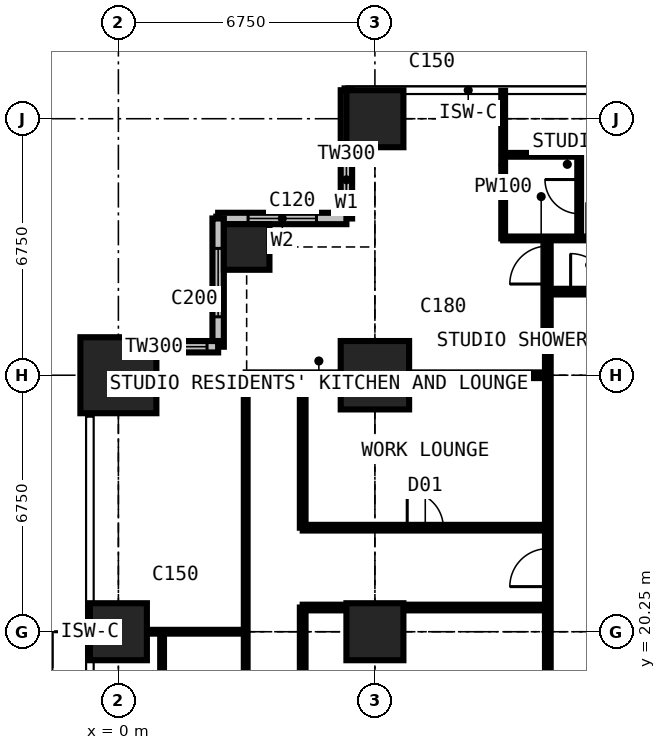
"""IFC4 building model, lengths in metres.
Left out: names, types, materials, properties, quantities, classifications, styles, units other than length and angle.
Written with IfcOpenShell. Run it as: python <this file> out.ifc"""

import sys

from ifc_helpers import new_model, si_unit, direction, frame, frame_2d, origin, origin_2d, place, context, subcontext, project, spatial, rectangle, extrude, element, fill, save


model = new_model("IFC4")
c1 = context("Model", 3, precision=1e-05, world=origin(), true_north=direction((0.0, 1.0)))
c2 = subcontext(c1, "Body", "Model", "MODEL_VIEW")
j1 = project(units=[si_unit("LENGTHUNIT", "METRE"), si_unit("PLANEANGLEUNIT", "RADIAN")], contexts=[c1])
p1 = place(None, origin())
s1 = spatial("IfcSite", under=j1, at=p1, CompositionType="ELEMENT")
p2 = place(p1, origin())
s2 = spatial("IfcBuilding", under=s1, at=p2, CompositionType="ELEMENT")
p3 = place(p2, frame((0.0, 0.0, 145.8)))
s3 = spatial("IfcBuildingStorey", under=s2, at=p3, CompositionType="ELEMENT", Elevation=145.8)
p4 = place(p3, frame((0.0, 20.25, 0.0), z_axis=(0.0, 0.0, 1.0), x_axis=(1.0, 0.0, 0.0)))
e1 = element("IfcColumn", 1, at=p4, inside=s3, PredefinedType="COLUMN", context=c2, shape_type="SweptSolid", body=[
    extrude(rectangle(XDim=1.5, YDim=1.5, at=origin_2d()), origin(), (0.0, 0.0, 1.0), 3.6),
])
p5 = place(p3, frame((0.0, 27.0, 0.0), z_axis=(0.0, 0.0, 1.0), x_axis=(1.0, 0.0, 0.0)))
e2 = element("IfcColumn", 2, at=p5, inside=s3, PredefinedType="COLUMN", context=c2, shape_type="SweptSolid", body=[
    extrude(rectangle(XDim=2.0, YDim=2.0, at=origin_2d()), origin(), (0.0, 0.0, 1.0), 3.6),
])
p6 = place(p3, frame((3.375, 30.375, 0.0), z_axis=(0.0, 0.0, 1.0), x_axis=(1.0, 0.0, 0.0)))
e3 = element("IfcColumn", 3, at=p6, inside=s3, PredefinedType="COLUMN", context=c2, shape_type="SweptSolid", body=[
    extrude(rectangle(XDim=1.2, YDim=1.2, at=origin_2d()), origin(), (0.0, 0.0, 1.0), 3.6),
])
p7 = place(p3, frame((6.75, 20.25, 0.0), z_axis=(0.0, 0.0, 1.0), x_axis=(1.0, 0.0, 0.0)))
e4 = element("IfcColumn", 4, at=p7, inside=s3, PredefinedType="COLUMN", context=c2, shape_type="SweptSolid", body=[
    extrude(rectangle(XDim=1.5, YDim=1.5, at=origin_2d()), origin(), (0.0, 0.0, 1.0), 3.6),
])
p8 = place(p3, frame((6.75, 27.0, 0.0), z_axis=(0.0, 0.0, 1.0), x_axis=(1.0, 0.0, 0.0)))
e5 = element("IfcColumn", 5, at=p8, inside=s3, PredefinedType="COLUMN", context=c2, shape_type="SweptSolid", body=[
    extrude(rectangle(XDim=1.8, YDim=1.8, at=origin_2d()), origin(), (0.0, 0.0, 1.0), 3.6),
])
p9 = place(p3, frame((6.75, 33.75, 0.0), z_axis=(0.0, 0.0, 1.0), x_axis=(1.0, 0.0, 0.0)))
e6 = element("IfcColumn", 6, at=p9, inside=s3, PredefinedType="COLUMN", context=c2, shape_type="SweptSolid", body=[
    extrude(rectangle(XDim=1.5, YDim=1.5, at=origin_2d()), origin(), (0.0, 0.0, 1.0), 3.6),
])
p10 = place(p3, frame((6.0, 34.5, 0.0), z_axis=(0.0, 0.0, 1.0), x_axis=(0.0, -1.0, 0.0)))
e7 = element("IfcWall", 7, at=p10, inside=s3, PredefinedType="SOLIDWALL", context=c2, shape_type="SweptSolid", body=[
    extrude(rectangle(XDim=3.375, YDim=0.3, at=frame_2d((1.688, 0.0))), origin(), (0.0, 0.0, 1.0), 3.375),
])
p11 = place(p10, frame((1.607, 0.0, 0.9)))
e8 = element("IfcOpeningElement", 8, at=p11, cuts=e7, PredefinedType="OPENING", context=c2, shape_type="SweptSolid", body=[
    extrude(rectangle(XDim=1.5, YDim=1.8, at=frame_2d((0.75, 0.9))), frame((0.0, 0.16, 0.0), z_axis=(0.0, -1.0, 0.0), x_axis=(1.0, 0.0, 0.0)), (0.0, 0.0, 1.0), 0.32),
])
p12 = place(p3, frame((6.0, 31.125, 0.0), z_axis=(0.0, 0.0, 1.0), x_axis=(-1.0, 0.0, 0.0)))
e9 = element("IfcWall", 9, at=p12, inside=s3, PredefinedType="SOLIDWALL", context=c2, shape_type="SweptSolid", body=[
    extrude(rectangle(XDim=3.375, YDim=0.3, at=frame_2d((1.688, 0.0))), origin(), (0.0, 0.0, 1.0), 3.375),
])
p13 = place(p12, frame((0.788, 0.0, 0.6)))
e10 = element("IfcOpeningElement", 10, at=p13, cuts=e9, PredefinedType="OPENING", context=c2, shape_type="SweptSolid", body=[
    extrude(rectangle(XDim=1.8, YDim=2.1, at=frame_2d((0.9, 1.05))), frame((0.0, 0.16, 0.0), z_axis=(0.0, -1.0, 0.0), x_axis=(1.0, 0.0, 0.0)), (0.0, 0.0, 1.0), 0.32),
])
p14 = place(p3, frame((2.625, 31.125, 0.0), z_axis=(0.0, 0.0, 1.0), x_axis=(0.0, -1.0, 0.0)))
e11 = element("IfcWall", 11, at=p14, inside=s3, PredefinedType="SOLIDWALL", context=c2, shape_type="SweptSolid", body=[
    extrude(rectangle(XDim=3.375, YDim=0.3, at=frame_2d((1.688, 0.0))), origin(), (0.0, 0.0, 1.0), 3.375),
])
p15 = place(p14, frame((0.788, 0.0, 0.6)))
e12 = element("IfcOpeningElement", 12, at=p15, cuts=e11, PredefinedType="OPENING", context=c2, shape_type="SweptSolid", body=[
    extrude(rectangle(XDim=1.8, YDim=2.1, at=frame_2d((0.9, 1.05))), frame((0.0, 0.16, 0.0), z_axis=(0.0, -1.0, 0.0), x_axis=(1.0, 0.0, 0.0)), (0.0, 0.0, 1.0), 0.32),
])
p16 = place(p3, frame((2.625, 27.75, 0.0), z_axis=(0.0, 0.0, 1.0), x_axis=(-1.0, 0.0, 0.0)))
e13 = element("IfcWall", 13, at=p16, inside=s3, PredefinedType="SOLIDWALL", context=c2, shape_type="SweptSolid", body=[
    extrude(rectangle(XDim=3.375, YDim=0.3, at=frame_2d((1.688, 0.0))), origin(), (0.0, 0.0, 1.0), 3.375),
])
p17 = place(p16, frame((0.292, 0.0, 0.9)))
e14 = element("IfcOpeningElement", 14, at=p17, cuts=e13, PredefinedType="OPENING", context=c2, shape_type="SweptSolid", body=[
    extrude(rectangle(XDim=1.2, YDim=1.8, at=frame_2d((0.6, 0.9))), frame((0.0, 0.16, 0.0), z_axis=(0.0, -1.0, 0.0), x_axis=(1.0, 0.0, 0.0)), (0.0, 0.0, 1.0), 0.32),
])
p18 = place(p3, frame((-0.734, 20.25, 0.0), z_axis=(0.0, 0.0, 1.0), x_axis=(1.0, 0.0, 0.0)))
e15 = element("IfcWall", 15, at=p18, inside=s3, PredefinedType="PARTITIONING", context=c2, shape_type="SweptSolid", body=[
    extrude(rectangle(XDim=4.084, YDim=0.1, at=frame_2d((2.042, 0.0))), origin(), (0.0, 0.0, 1.0), 2.61),
])
p19 = place(p3, frame((1.15, 18.25, 0.0), z_axis=(0.0, 0.0, 1.0), x_axis=(0.0, 1.0, 0.0)))
e16 = element("IfcWall", 16, at=p19, inside=s3, PredefinedType="PARTITIONING", context=c2, shape_type="SweptSolid", body=[
    extrude(rectangle(XDim=2.0, YDim=0.1, at=frame_2d((1.0, 0.0))), origin(), (0.0, 0.0, 1.0), 3.375),
])
p20 = place(p3, frame((3.35, 10.125, 0.0), z_axis=(0.0, 0.0, 1.0), x_axis=(0.0, 1.0, 0.0)))
e17 = element("IfcWall", 17, at=p20, inside=s3, PredefinedType="PARTITIONING", context=c2, shape_type="SweptSolid", body=[
    extrude(rectangle(XDim=16.875, YDim=0.1, at=frame_2d((8.438, 0.0))), origin(), (0.0, 0.0, 1.0), 3.375),
])
p21 = place(p20, frame((0.2, 0.0, 0.0)))
e18 = element("IfcOpeningElement", 18, at=p21, cuts=e17, PredefinedType="OPENING", context=c2, shape_type="SweptSolid", body=[
    extrude(rectangle(XDim=0.95, YDim=2.2, at=frame_2d((0.475, 1.1))), frame((0.0, 0.06, 0.0), z_axis=(0.0, -1.0, 0.0), x_axis=(1.0, 0.0, 0.0)), (0.0, 0.0, 1.0), 0.12),
])
p22 = place(p20, frame((3.575, 0.0, 0.0)))
e19 = element("IfcOpeningElement", 19, at=p22, cuts=e17, PredefinedType="OPENING", context=c2, shape_type="SweptSolid", body=[
    extrude(rectangle(XDim=0.95, YDim=2.2, at=frame_2d((0.475, 1.1))), frame((0.0, 0.06, 0.0), z_axis=(0.0, -1.0, 0.0), x_axis=(1.0, 0.0, 0.0)), (0.0, 0.0, 1.0), 0.12),
])
p23 = place(p20, frame((6.95, 0.0, 0.0)))
e20 = element("IfcOpeningElement", 20, at=p23, cuts=e17, PredefinedType="OPENING", context=c2, shape_type="SweptSolid", body=[
    extrude(rectangle(XDim=0.95, YDim=2.2, at=frame_2d((0.475, 1.1))), frame((0.0, 0.06, 0.0), z_axis=(0.0, -1.0, 0.0), x_axis=(1.0, 0.0, 0.0)), (0.0, 0.0, 1.0), 0.12),
])
p24 = place(p3, frame((3.35, 27.0, 0.0), z_axis=(0.0, 0.0, 1.0), x_axis=(1.0, 0.0, 0.0)))
e21 = element("IfcWall", 21, at=p24, inside=s3, PredefinedType="PARTITIONING", context=c2, shape_type="SweptSolid", body=[
    extrude(rectangle(XDim=7.95, YDim=0.15, at=frame_2d((3.975, 0.0))), origin(), (0.0, 0.0, 1.0), 2.806),
])
p25 = place(p3, frame((4.85, 12.775, 0.0), z_axis=(0.0, 0.0, 1.0), x_axis=(0.0, 1.0, 0.0)))
e22 = element("IfcWall", 22, at=p25, inside=s3, PredefinedType="PARTITIONING", context=c2, shape_type="SweptSolid", body=[
    extrude(rectangle(XDim=8.113, YDim=0.15, at=frame_2d((4.056, 0.0))), origin(), (0.0, 0.0, 1.0), 3.375),
])
p26 = place(p25, frame((3.6, 0.0, 0.0)))
e23 = element("IfcOpeningElement", 23, at=p26, cuts=e22, PredefinedType="OPENING", context=c2, shape_type="SweptSolid", body=[
    extrude(rectangle(XDim=0.95, YDim=2.2, at=frame_2d((0.475, 1.1))), frame((0.0, 0.085, 0.0), z_axis=(0.0, -1.0, 0.0), x_axis=(1.0, 0.0, 0.0)), (0.0, 0.0, 1.0), 0.17),
])
p27 = place(p3, frame((4.85, 20.887, 0.0), z_axis=(0.0, 0.0, 1.0), x_axis=(1.0, 0.0, 0.0)))
e24 = element("IfcWall", 24, at=p27, inside=s3, PredefinedType="PARTITIONING", context=c2, shape_type="SweptSolid", body=[
    extrude(rectangle(XDim=6.45, YDim=0.15, at=frame_2d((3.225, 0.0))), origin(), (0.0, 0.0, 1.0), 3.375),
])
p28 = place(p3, frame((4.85, 22.988, 0.0), z_axis=(0.0, 0.0, 1.0), x_axis=(0.0, 1.0, 0.0)))
e25 = element("IfcWall", 25, at=p28, inside=s3, PredefinedType="PARTITIONING", context=c2, shape_type="SweptSolid", body=[
    extrude(rectangle(XDim=4.012, YDim=0.15, at=frame_2d((2.006, 0.0))), origin(), (0.0, 0.0, 1.0), 3.375),
])
p29 = place(p3, frame((4.85, 22.988, 0.0), z_axis=(0.0, 0.0, 1.0), x_axis=(1.0, 0.0, 0.0)))
e26 = element("IfcWall", 26, at=p29, inside=s3, PredefinedType="PARTITIONING", context=c2, shape_type="SweptSolid", body=[
    extrude(rectangle(XDim=6.45, YDim=0.15, at=frame_2d((3.225, 0.0))), origin(), (0.0, 0.0, 1.0), 3.375),
])
p30 = place(p29, frame((2.75, 0.0, 0.0)))
e27 = element("IfcOpeningElement", 27, at=p30, cuts=e26, PredefinedType="OPENING", context=c2, shape_type="SweptSolid", body=[
    extrude(rectangle(XDim=0.95, YDim=2.2, at=frame_2d((0.475, 1.1))), frame((0.0, 0.085, 0.0), z_axis=(0.0, -1.0, 0.0), x_axis=(1.0, 0.0, 0.0)), (0.0, 0.0, 1.0), 0.17),
])
p31 = place(p3, frame((10.125, 30.6, 0.0), z_axis=(0.0, 0.0, 1.0), x_axis=(0.0, 1.0, 0.0)))
e28 = element("IfcWall", 28, at=p31, inside=s3, PredefinedType="PARTITIONING", context=c2, shape_type="SweptSolid", body=[
    extrude(rectangle(XDim=3.884, YDim=0.1, at=frame_2d((1.942, 0.0))), origin(), (0.0, 0.0, 1.0), 3.375),
])
p32 = place(p3, frame((10.125, 30.6, 0.0), z_axis=(0.0, 0.0, 1.0), x_axis=(1.0, 0.0, 0.0)))
e29 = element("IfcWall", 29, at=p32, inside=s3, PredefinedType="PARTITIONING", context=c2, shape_type="SweptSolid", body=[
    extrude(rectangle(XDim=3.375, YDim=0.1, at=frame_2d((1.688, 0.0))), origin(), (0.0, 0.0, 1.0), 3.375),
])
p33 = place(p32, frame((2.2, 0.0, 0.0)))
e30 = element("IfcOpeningElement", 30, at=p33, cuts=e29, PredefinedType="OPENING", context=c2, shape_type="SweptSolid", body=[
    extrude(rectangle(XDim=0.95, YDim=2.2, at=frame_2d((0.475, 1.1))), frame((0.0, 0.06, 0.0), z_axis=(0.0, -1.0, 0.0), x_axis=(1.0, 0.0, 0.0)), (0.0, 0.0, 1.0), 0.12),
])
p34 = place(p3, frame((10.125, 32.8, 0.0), z_axis=(0.0, 0.0, 1.0), x_axis=(1.0, 0.0, 0.0)))
e31 = element("IfcWall", 31, at=p34, inside=s3, PredefinedType="PARTITIONING", context=c2, shape_type="SweptSolid", body=[
    extrude(rectangle(XDim=2.0, YDim=0.1, at=frame_2d((1.0, 0.0))), origin(), (0.0, 0.0, 1.0), 3.375),
])
p35 = place(p3, frame((11.3, 11.3, 0.0), z_axis=(0.0, 0.0, 1.0), x_axis=(0.0, 1.0, 0.0)))
e32 = element("IfcWall", 32, at=p35, inside=s3, PredefinedType="PARTITIONING", context=c2, shape_type="SweptSolid", body=[
    extrude(rectangle(XDim=19.3, YDim=0.15, at=frame_2d((9.65, 0.0))), origin(), (0.0, 0.0, 1.0), 3.375),
])
p36 = place(p35, frame((18.1, 0.0, 0.0)))
e33 = element("IfcOpeningElement", 33, at=p36, cuts=e32, PredefinedType="OPENING", context=c2, shape_type="SweptSolid", body=[
    extrude(rectangle(XDim=1.0, YDim=2.2, at=frame_2d((0.5, 1.1))), frame((0.0, 0.085, 0.0), z_axis=(0.0, -1.0, 0.0), x_axis=(1.0, 0.0, 0.0)), (0.0, 0.0, 1.0), 0.17),
])
p37 = place(p35, frame((10.137, 0.0, 0.0)))
e34 = element("IfcOpeningElement", 34, at=p37, cuts=e32, PredefinedType="OPENING", context=c2, shape_type="SweptSolid", body=[
    extrude(rectangle(XDim=1.0, YDim=2.2, at=frame_2d((0.5, 1.1))), frame((0.0, 0.085, 0.0), z_axis=(0.0, -1.0, 0.0), x_axis=(1.0, 0.0, 0.0)), (0.0, 0.0, 1.0), 0.17),
])
p38 = place(p3, frame((11.3, 29.2, 0.0), z_axis=(0.0, 0.0, 1.0), x_axis=(1.0, 0.0, 0.0)))
e35 = element("IfcWall", 35, at=p38, inside=s3, PredefinedType="PARTITIONING", context=c2, shape_type="SweptSolid", body=[
    extrude(rectangle(XDim=19.809, YDim=0.15, at=frame_2d((9.904, 0.0))), origin(), (0.0, 0.0, 1.0), 3.375),
])
p39 = place(p38, frame((12.9, 0.0, 0.0)))
e36 = element("IfcOpeningElement", 36, at=p39, cuts=e35, PredefinedType="OPENING", context=c2, shape_type="SweptSolid", body=[
    extrude(rectangle(XDim=1.0, YDim=2.2, at=frame_2d((0.5, 1.1))), frame((0.0, 0.085, 0.0), z_axis=(0.0, -1.0, 0.0), x_axis=(1.0, 0.0, 0.0)), (0.0, 0.0, 1.0), 0.17),
])
p40 = place(p38, frame((5.825, 0.0, 0.0)))
e37 = element("IfcOpeningElement", 37, at=p40, cuts=e35, PredefinedType="OPENING", context=c2, shape_type="SweptSolid", body=[
    extrude(rectangle(XDim=0.95, YDim=2.2, at=frame_2d((0.475, 1.1))), frame((0.0, 0.085, 0.0), z_axis=(0.0, -1.0, 0.0), x_axis=(1.0, 0.0, 0.0)), (0.0, 0.0, 1.0), 0.17),
])
p41 = place(p38, frame((0.6, 0.0, 0.0)))
e38 = element("IfcOpeningElement", 38, at=p41, cuts=e35, PredefinedType="OPENING", context=c2, shape_type="SweptSolid", body=[
    extrude(rectangle(XDim=1.0, YDim=2.2, at=frame_2d((0.5, 1.1))), frame((0.0, 0.085, 0.0), z_axis=(0.0, -1.0, 0.0), x_axis=(1.0, 0.0, 0.0)), (0.0, 0.0, 1.0), 0.17),
])
p42 = place(p3, frame((12.125, 30.6, 0.0), z_axis=(0.0, 0.0, 1.0), x_axis=(0.0, 1.0, 0.0)))
e39 = element("IfcWall", 39, at=p42, inside=s3, PredefinedType="PARTITIONING", context=c2, shape_type="SweptSolid", body=[
    extrude(rectangle(XDim=2.2, YDim=0.1, at=frame_2d((1.1, 0.0))), origin(), (0.0, 0.0, 1.0), 3.375),
])
p43 = place(p42, frame((0.65, 0.0, 0.0)))
e40 = element("IfcOpeningElement", 40, at=p43, cuts=e39, PredefinedType="OPENING", context=c2, shape_type="SweptSolid", body=[
    extrude(rectangle(XDim=0.9, YDim=2.2, at=frame_2d((0.45, 1.1))), frame((0.0, 0.06, 0.0), z_axis=(0.0, -1.0, 0.0), x_axis=(1.0, 0.0, 0.0)), (0.0, 0.0, 1.0), 0.12),
])
p44 = place(p11, origin())
e41 = element("IfcWindow", 41, at=p44, inside=s3, PartitioningType="SINGLE_PANEL", PredefinedType="WINDOW", context=c2, shape_type="SweptSolid", body=[
    extrude(rectangle(XDim=1.5, YDim=1.8, at=frame_2d((0.75, 0.9))), frame((0.0, 0.03, 0.0), z_axis=(0.0, -1.0, 0.0), x_axis=(1.0, 0.0, 0.0)), (0.0, 0.0, 1.0), 0.06),
])
fill(e8, e41)
p45 = place(p13, origin())
e42 = element("IfcWindow", 42, at=p45, inside=s3, PartitioningType="SINGLE_PANEL", PredefinedType="WINDOW", context=c2, shape_type="SweptSolid", body=[
    extrude(rectangle(XDim=1.8, YDim=2.1, at=frame_2d((0.9, 1.05))), frame((0.0, 0.03, 0.0), z_axis=(0.0, -1.0, 0.0), x_axis=(1.0, 0.0, 0.0)), (0.0, 0.0, 1.0), 0.06),
])
fill(e10, e42)
p46 = place(p15, origin())
e43 = element("IfcWindow", 43, at=p46, inside=s3, PartitioningType="SINGLE_PANEL", PredefinedType="WINDOW", context=c2, shape_type="SweptSolid", body=[
    extrude(rectangle(XDim=1.8, YDim=2.1, at=frame_2d((0.9, 1.05))), frame((0.0, 0.03, 0.0), z_axis=(0.0, -1.0, 0.0), x_axis=(1.0, 0.0, 0.0)), (0.0, 0.0, 1.0), 0.06),
])
fill(e12, e43)
p47 = place(p17, origin())
e44 = element("IfcWindow", 44, at=p47, inside=s3, PartitioningType="SINGLE_PANEL", PredefinedType="WINDOW", context=c2, shape_type="SweptSolid", body=[
    extrude(rectangle(XDim=1.2, YDim=1.8, at=frame_2d((0.6, 0.9))), frame((0.0, 0.03, 0.0), z_axis=(0.0, -1.0, 0.0), x_axis=(1.0, 0.0, 0.0)), (0.0, 0.0, 1.0), 0.06),
])
fill(e14, e44)
p48 = place(p43, origin())
e45 = element("IfcDoor", 45, at=p48, inside=s3, OperationType="SINGLE_SWING_RIGHT", PredefinedType="DOOR", context=c2, shape_type="SweptSolid", body=[
    extrude(rectangle(XDim=0.9, YDim=2.2, at=frame_2d((0.45, 1.1))), frame((0.0, 0.025, 0.0), z_axis=(0.0, -1.0, 0.0), x_axis=(1.0, 0.0, 0.0)), (0.0, 0.0, 1.0), 0.05),
])
fill(e40, e45)
p49 = place(p41, origin())
e46 = element("IfcDoor", 46, at=p49, inside=s3, OperationType="SINGLE_SWING_LEFT", PredefinedType="DOOR", context=c2, shape_type="SweptSolid", body=[
    extrude(rectangle(XDim=1.0, YDim=2.2, at=frame_2d((0.5, 1.1))), frame((0.0, 0.025, 0.0), z_axis=(0.0, -1.0, 0.0), x_axis=(1.0, 0.0, 0.0)), (0.0, 0.0, 1.0), 0.05),
])
fill(e38, e46)
p50 = place(p36, origin())
e47 = element("IfcDoor", 47, at=p50, inside=s3, OperationType="SINGLE_SWING_LEFT", PredefinedType="DOOR", context=c2, shape_type="SweptSolid", body=[
    extrude(rectangle(XDim=1.0, YDim=2.2, at=frame_2d((0.5, 1.1))), frame((0.0, 0.025, 0.0), z_axis=(0.0, -1.0, 0.0), x_axis=(1.0, 0.0, 0.0)), (0.0, 0.0, 1.0), 0.05),
])
fill(e33, e47)
p51 = place(p37, origin())
e48 = element("IfcDoor", 48, at=p51, inside=s3, OperationType="SINGLE_SWING_LEFT", PredefinedType="DOOR", context=c2, shape_type="SweptSolid", body=[
    extrude(rectangle(XDim=1.0, YDim=2.2, at=frame_2d((0.5, 1.1))), frame((0.0, 0.025, 0.0), z_axis=(0.0, -1.0, 0.0), x_axis=(1.0, 0.0, 0.0)), (0.0, 0.0, 1.0), 0.05),
])
fill(e34, e48)
p52 = place(p30, origin())
e49 = element("IfcDoor", 49, at=p52, inside=s3, OperationType="SINGLE_SWING_LEFT", PredefinedType="DOOR", context=c2, shape_type="SweptSolid", body=[
    extrude(rectangle(XDim=0.95, YDim=2.2, at=frame_2d((0.475, 1.1))), frame((0.0, 0.025, 0.0), z_axis=(0.0, -1.0, 0.0), x_axis=(1.0, 0.0, 0.0)), (0.0, 0.0, 1.0), 0.05),
])
fill(e27, e49)
save(model, sys.argv[1])
